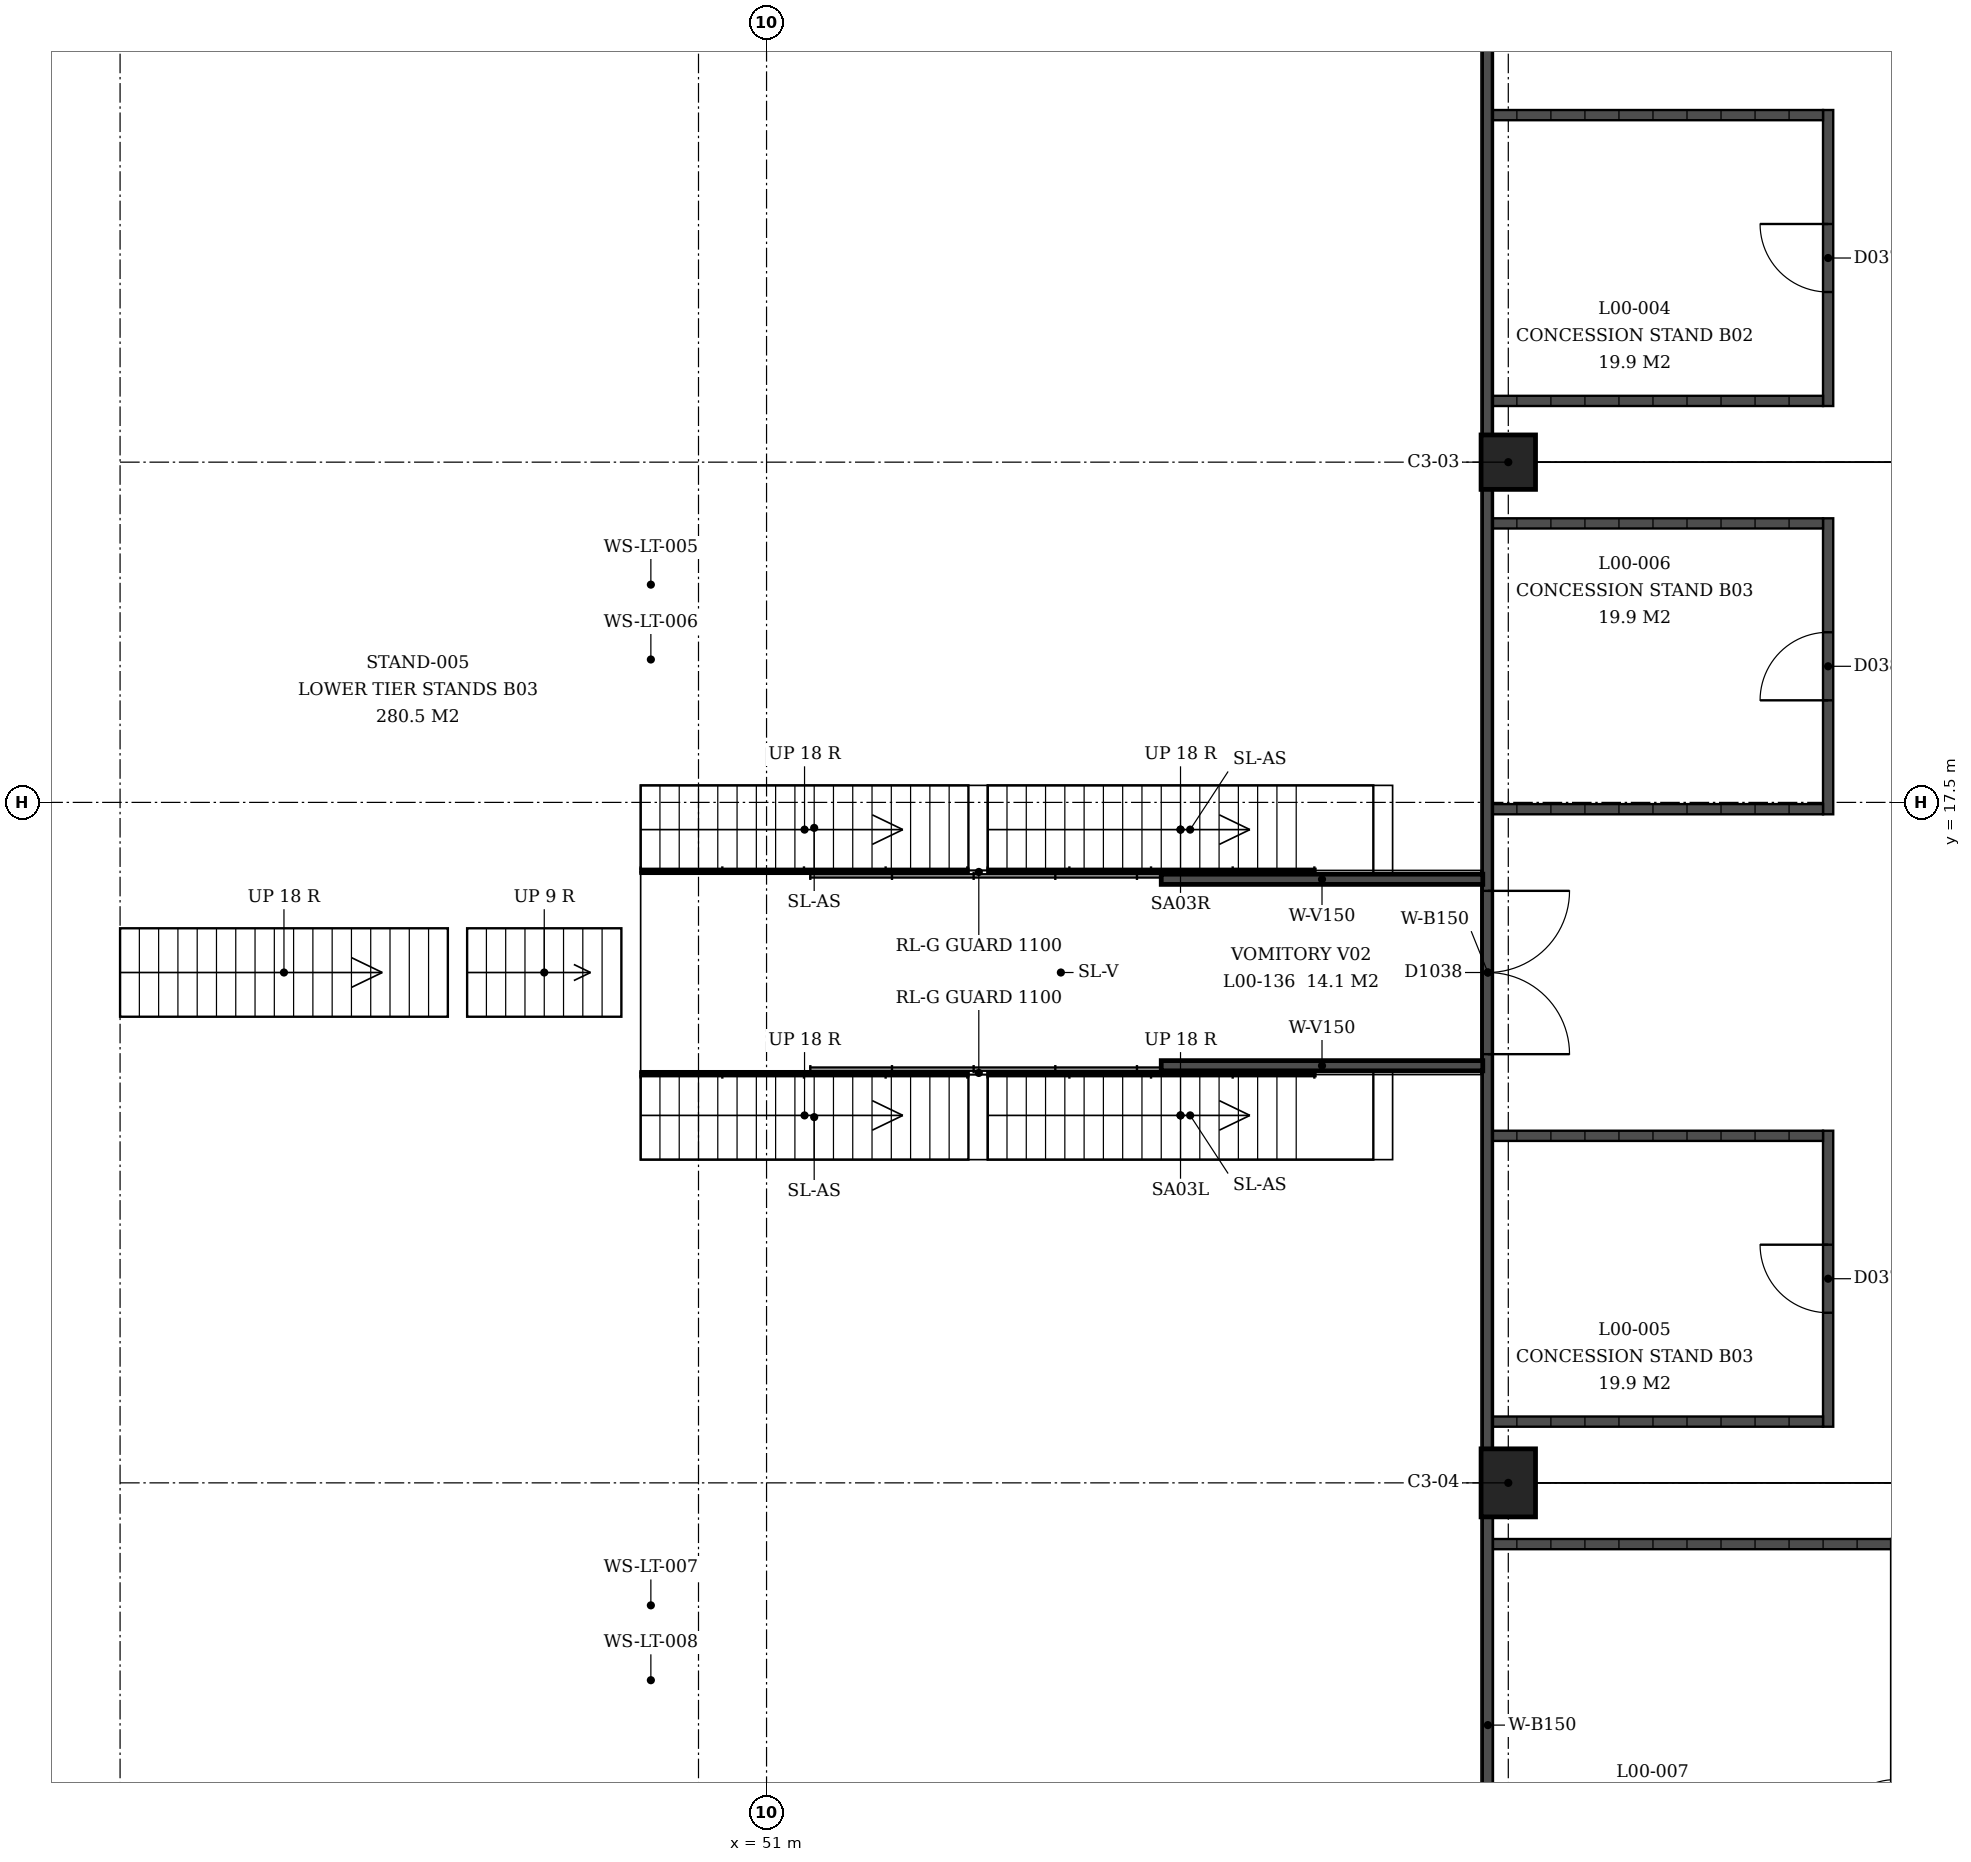
"""IFC4 building model, lengths in metres.
Left out: names, types, materials, properties, quantities, classifications, styles, units other than length and angle.
Written with IfcOpenShell. Run it as: python <this file> out.ifc"""

import sys

from ifc_helpers import new_model, si_unit, direction, frame, frame_2d, origin, origin_2d, place, context, subcontext, project, spatial, rectangle, extrude, element, fill, save


model = new_model("IFC4")
c1 = context("Model", 3, precision=1e-05, world=origin(), true_north=direction((0.0, 1.0)))
c2 = subcontext(c1, "Body", "Model", "MODEL_VIEW")
j1 = project(units=[si_unit("LENGTHUNIT", "METRE"), si_unit("PLANEANGLEUNIT", "RADIAN")], contexts=[c1])
p1 = place(None, origin())
s1 = spatial("IfcSite", under=j1, at=p1, CompositionType="ELEMENT")
p2 = place(p1, origin())
s2 = spatial("IfcBuilding", under=s1, at=p2, CompositionType="ELEMENT")
p3 = place(p2, origin())
s3 = spatial("IfcBuildingStorey", under=s2, at=p3, CompositionType="ELEMENT", Elevation=0.0)
p4 = place(p3, frame((61.9, 22.5, 0.0), z_axis=(0.0, 0.0, 1.0), x_axis=(0.0, 1.0, 0.0)))
e1 = element("IfcColumn", 1, at=p4, inside=s3, PredefinedType="COLUMN", context=c2, shape_type="SweptSolid", body=[
    extrude(rectangle(XDim=0.8, YDim=0.8, at=origin_2d()), origin(), (0.0, 0.0, 1.0), 4.5),
])
p5 = place(p3, frame((61.9, 7.5, 0.0), z_axis=(0.0, 0.0, 1.0), x_axis=(0.0, 1.0, 0.0)))
e2 = element("IfcColumn", 2, at=p5, inside=s3, PredefinedType="COLUMN", context=c2, shape_type="SweptSolid", body=[
    extrude(rectangle(XDim=1.0, YDim=0.8, at=origin_2d()), origin(), (0.0, 0.0, 1.0), 4.5),
])
p6 = place(p3, frame((66.6, 27.675, 0.0), z_axis=(0.0, 0.0, 1.0), x_axis=(0.0, -1.0, 0.0)))
e3 = element("IfcWall", 3, at=p6, inside=s3, PredefinedType="SOLIDWALL", context=c2, shape_type="SweptSolid", body=[
    extrude(rectangle(XDim=4.35, YDim=0.15, at=frame_2d((2.175, 0.0))), origin(), (0.0, 0.0, 1.0), 3.0),
])
p7 = place(p6, frame((1.675, 0.0, 0.0)))
e4 = element("IfcOpeningElement", 4, at=p7, cuts=e3, PredefinedType="OPENING", context=c2, shape_type="SweptSolid", body=[
    extrude(rectangle(XDim=1.0, YDim=2.1, at=frame_2d((0.5, 1.05))), frame((0.0, 0.075, 0.0), z_axis=(0.0, -1.0, 0.0), x_axis=(1.0, 0.0, 0.0)), (0.0, 0.0, 1.0), 0.15),
])
for number, where, z_axis, x_axis in (
    (5, (61.6, 27.6, 0.0), (0.0, 0.0, 1.0), (1.0, 0.0, 0.0)),
    (6, (61.6, 23.4, 0.0), (0.0, 0.0, 1.0), (1.0, 0.0, 0.0)),
):
    element("IfcWall", number, at=place(p3, frame(where, z_axis=z_axis, x_axis=x_axis)), inside=s3, PredefinedType="SOLIDWALL", context=c2, shape_type="SweptSolid", body=[
        extrude(rectangle(XDim=4.925, YDim=0.15, at=frame_2d((2.462, 0.0))), origin(), (0.0, 0.0, 1.0), 3.0),
    ])
p8 = place(p3, frame((66.6, 8.325, 0.0), z_axis=(0.0, 0.0, 1.0), x_axis=(0.0, 1.0, 0.0)))
e7 = element("IfcWall", 7, at=p8, inside=s3, PredefinedType="SOLIDWALL", context=c2, shape_type="SweptSolid", body=[
    extrude(rectangle(XDim=4.35, YDim=0.15, at=frame_2d((2.175, 0.0))), origin(), (0.0, 0.0, 1.0), 3.0),
])
p9 = place(p8, frame((1.675, 0.0, 0.0)))
e8 = element("IfcOpeningElement", 8, at=p9, cuts=e7, PredefinedType="OPENING", context=c2, shape_type="SweptSolid", body=[
    extrude(rectangle(XDim=1.0, YDim=2.1, at=frame_2d((0.5, 1.05))), frame((0.0, 0.075, 0.0), z_axis=(0.0, -1.0, 0.0), x_axis=(1.0, 0.0, 0.0)), (0.0, 0.0, 1.0), 0.15),
])
for number, where, z_axis, x_axis in (
    (9, (61.6, 8.4, 0.0), (0.0, 0.0, 1.0), (1.0, 0.0, 0.0)),
    (10, (61.6, 12.6, 0.0), (0.0, 0.0, 1.0), (1.0, 0.0, 0.0)),
):
    element("IfcWall", number, at=place(p3, frame(where, z_axis=z_axis, x_axis=x_axis)), inside=s3, PredefinedType="SOLIDWALL", context=c2, shape_type="SweptSolid", body=[
        extrude(rectangle(XDim=4.925, YDim=0.15, at=frame_2d((2.462, 0.0))), origin(), (0.0, 0.0, 1.0), 3.0),
    ])
p10 = place(p3, frame((66.6, 17.325, 0.0), z_axis=(0.0, 0.0, 1.0), x_axis=(0.0, 1.0, 0.0)))
e11 = element("IfcWall", 11, at=p10, inside=s3, PredefinedType="SOLIDWALL", context=c2, shape_type="SweptSolid", body=[
    extrude(rectangle(XDim=4.35, YDim=0.15, at=frame_2d((2.175, 0.0))), origin(), (0.0, 0.0, 1.0), 3.0),
])
p11 = place(p10, frame((1.675, 0.0, 0.0)))
e12 = element("IfcOpeningElement", 12, at=p11, cuts=e11, PredefinedType="OPENING", context=c2, shape_type="SweptSolid", body=[
    extrude(rectangle(XDim=1.0, YDim=2.1, at=frame_2d((0.5, 1.05))), frame((0.0, 0.075, 0.0), z_axis=(0.0, -1.0, 0.0), x_axis=(1.0, 0.0, 0.0)), (0.0, 0.0, 1.0), 0.15),
])
for number, where, z_axis, x_axis in (
    (13, (61.6, 17.4, 0.0), (0.0, 0.0, 1.0), (1.0, 0.0, 0.0)),
    (14, (61.6, 21.6, 0.0), (0.0, 0.0, 1.0), (1.0, 0.0, 0.0)),
):
    element("IfcWall", number, at=place(p3, frame(where, z_axis=z_axis, x_axis=x_axis)), inside=s3, PredefinedType="SOLIDWALL", context=c2, shape_type="SweptSolid", body=[
        extrude(rectangle(XDim=4.925, YDim=0.15, at=frame_2d((2.462, 0.0))), origin(), (0.0, 0.0, 1.0), 3.0),
    ])
p12 = place(p3, frame((61.6, 6.6, 0.0), z_axis=(0.0, 0.0, 1.0), x_axis=(1.0, 0.0, 0.0)))
e15 = element("IfcWall", 15, at=p12, inside=s3, PredefinedType="SOLIDWALL", context=c2, shape_type="SweptSolid", body=[
    extrude(rectangle(XDim=5.925, YDim=0.15, at=frame_2d((2.962, 0.0))), origin(), (0.0, 0.0, 1.0), 3.0),
])
p13 = place(p3, frame((61.6, 37.0, 0.0), z_axis=(0.0, 0.0, 1.0), x_axis=(0.0, -1.0, 0.0)))
e16 = element("IfcWall", 16, at=p13, inside=s3, PredefinedType="SOLIDWALL", context=c2, shape_type="SweptSolid", body=[
    extrude(rectangle(XDim=14.1, YDim=0.15, at=frame_2d((7.05, 0.0))), origin(), (0.0, 0.0, 1.0), 3.0),
])
p14 = place(p3, frame((61.6, 22.1, 0.0), z_axis=(0.0, 0.0, 1.0), x_axis=(0.0, -1.0, 0.0)))
e17 = element("IfcWall", 17, at=p14, inside=s3, PredefinedType="SOLIDWALL", context=c2, shape_type="SweptSolid", body=[
    extrude(rectangle(XDim=14.1, YDim=0.15, at=frame_2d((7.05, 0.0))), origin(), (0.0, 0.0, 1.0), 3.0),
])
p15 = place(p14, frame((5.9, 0.0, 0.0)))
e18 = element("IfcOpeningElement", 18, at=p15, cuts=e17, PredefinedType="OPENING", context=c2, shape_type="SweptSolid", body=[
    extrude(rectangle(XDim=2.4, YDim=2.4, at=frame_2d((1.2, 1.2))), frame((0.0, 0.075, 0.0), z_axis=(0.0, -1.0, 0.0), x_axis=(1.0, 0.0, 0.0)), (0.0, 0.0, 1.0), 0.15),
])
p16 = place(p3, frame((61.6, 7.0, 0.0), z_axis=(0.0, 0.0, 1.0), x_axis=(0.0, -1.0, 0.0)))
e19 = element("IfcWall", 19, at=p16, inside=s3, PredefinedType="SOLIDWALL", context=c2, shape_type="SweptSolid", body=[
    extrude(rectangle(XDim=14.1, YDim=0.15, at=frame_2d((7.05, 0.0))), origin(), (0.0, 0.0, 1.0), 3.0),
])
for number, where, z_axis, x_axis in (
    (20, (56.8, 13.63, 0.0), (0.0, 0.0, 1.0), (1.0, 0.0, 0.0)),
    (21, (56.8, 16.37, 0.0), (0.0, 0.0, 1.0), (1.0, 0.0, 0.0)),
):
    element("IfcWall", number, at=place(p3, frame(where, z_axis=z_axis, x_axis=x_axis)), inside=s3, PredefinedType="SOLIDWALL", context=c2, shape_type="SweptSolid", body=[
        extrude(rectangle(XDim=4.725, YDim=0.15, at=frame_2d((2.362, 0.0))), origin(), (0.0, 0.0, 1.0), 2.75),
    ])
p17 = place(p7, origin())
e22 = element("IfcDoor", 22, at=p17, inside=s3, OperationType="SINGLE_SWING_LEFT", PredefinedType="DOOR", context=c2, shape_type="SweptSolid", body=[
    extrude(rectangle(XDim=1.0, YDim=2.1, at=frame_2d((0.5, 1.05))), frame((0.0, 0.025, 0.0), z_axis=(0.0, -1.0, 0.0), x_axis=(1.0, 0.0, 0.0)), (0.0, 0.0, 1.0), 0.05),
])
fill(e4, e22)
p18 = place(p9, origin())
e23 = element("IfcDoor", 23, at=p18, inside=s3, OperationType="SINGLE_SWING_LEFT", PredefinedType="DOOR", context=c2, shape_type="SweptSolid", body=[
    extrude(rectangle(XDim=1.0, YDim=2.1, at=frame_2d((0.5, 1.05))), frame((0.0, 0.025, 0.0), z_axis=(0.0, -1.0, 0.0), x_axis=(1.0, 0.0, 0.0)), (0.0, 0.0, 1.0), 0.05),
])
fill(e8, e23)
p19 = place(p11, origin())
e24 = element("IfcDoor", 24, at=p19, inside=s3, OperationType="SINGLE_SWING_RIGHT", PredefinedType="DOOR", context=c2, shape_type="SweptSolid", body=[
    extrude(rectangle(XDim=1.0, YDim=2.1, at=frame_2d((0.5, 1.05))), frame((0.0, 0.025, 0.0), z_axis=(0.0, -1.0, 0.0), x_axis=(1.0, 0.0, 0.0)), (0.0, 0.0, 1.0), 0.05),
])
fill(e12, e24)
p20 = place(p15, origin())
e25 = element("IfcDoor", 25, at=p20, inside=s3, OperationType="DOUBLE_DOOR_SINGLE_SWING", PredefinedType="DOOR", context=c2, shape_type="SweptSolid", body=[
    extrude(rectangle(XDim=2.4, YDim=2.4, at=frame_2d((1.2, 1.2))), frame((0.0, 0.025, 0.0), z_axis=(0.0, -1.0, 0.0), x_axis=(1.0, 0.0, 0.0)), (0.0, 0.0, 1.0), 0.05),
])
fill(e18, e25)
save(model, sys.argv[1])
